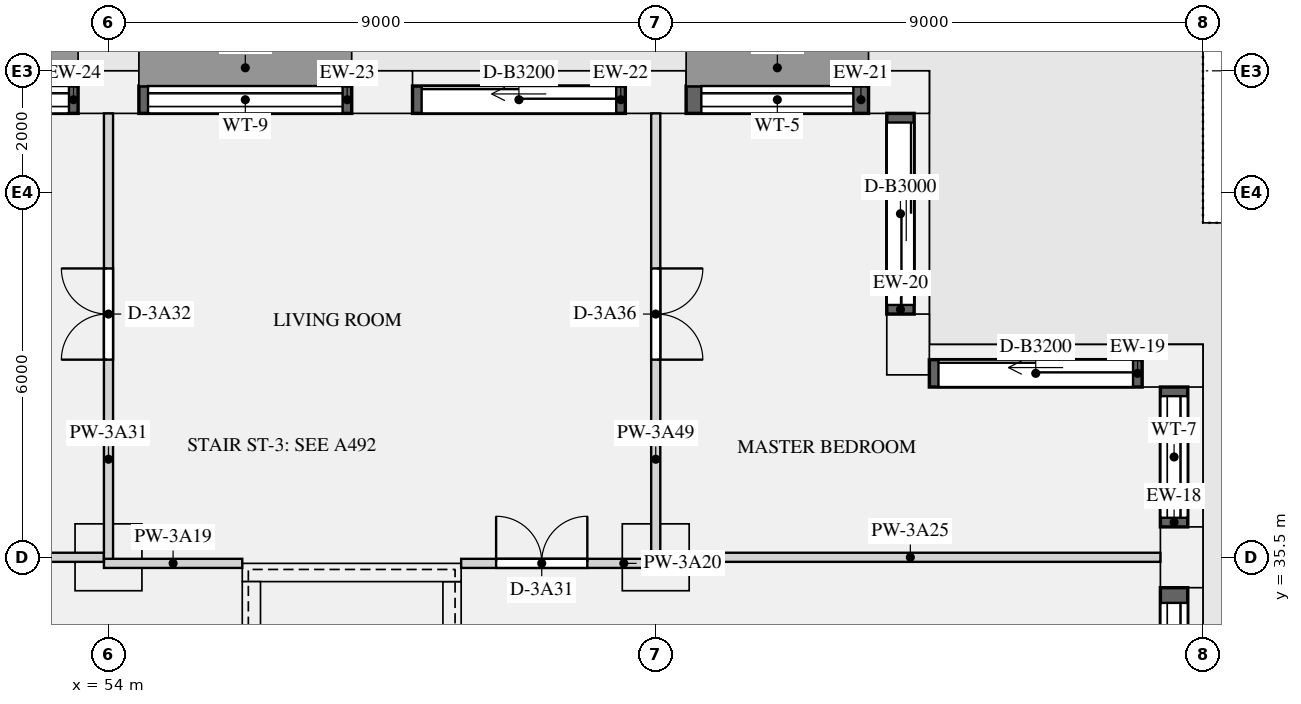
"""IFC4 building model, lengths in metres.
Left out: names, types, materials, properties, quantities, classifications, styles, units other than length and angle.
Written with IfcOpenShell. Run it as: python <this file> out.ifc"""

import sys

from ifc_helpers import new_model, si_unit, direction, frame, frame_2d, origin, origin_2d, place, context, subcontext, project, spatial, rectangle, extrude, element, fill, save


model = new_model("IFC4")
c1 = context("Model", 3, precision=1e-05, world=origin(), true_north=direction((0.0, 1.0)))
c2 = subcontext(c1, "Body", "Model", "MODEL_VIEW")
j1 = project(units=[si_unit("LENGTHUNIT", "METRE"), si_unit("PLANEANGLEUNIT", "RADIAN")], contexts=[c1])
p1 = place(None, origin())
s1 = spatial("IfcSite", under=j1, at=p1, CompositionType="ELEMENT")
p2 = place(p1, origin())
s2 = spatial("IfcBuilding", under=s1, at=p2, CompositionType="ELEMENT")
p3 = place(p2, frame((0.0, 0.0, 141.3)))
s3 = spatial("IfcBuildingStorey", under=s2, at=p3, CompositionType="ELEMENT", Elevation=141.3)
for number, where, z_axis, x_axis in (
    (1, (71.65, 35.5, 0.0), (0.0, 0.0, 1.0), (0.0, 1.0, 0.0)),
    (2, (71.5, 38.65, 0.0), (0.0, 0.0, 1.0), (-1.0, 0.0, 0.0)),
    (3, (67.15, 39.0, 0.0), (0.0, 0.0, 1.0), (0.0, 1.0, 0.0)),
    (4, (67.0, 43.15, 0.0), (0.0, 0.0, 1.0), (-1.0, 0.0, 0.0)),
    (5, (63.0, 43.15, 0.0), (0.0, 0.0, 1.0), (-1.0, 0.0, 0.0)),
    (6, (58.5, 43.15, 0.0), (0.0, 0.0, 1.0), (-1.0, 0.0, 0.0)),
    (7, (54.0, 43.15, 0.0), (0.0, 0.0, 1.0), (-1.0, 0.0, 0.0)),
):
    element("IfcColumn", number, at=place(p3, frame(where, z_axis=z_axis, x_axis=x_axis)), inside=s3, PredefinedType="USERDEFINED", context=c2, shape_type="SweptSolid", body=[
        extrude(rectangle(XDim=1.0, YDim=0.7, at=origin_2d()), origin(), (0.0, 0.0, 1.0), 3.15),
    ])
for number, where, z_axis, x_axis in (
    (8, (54.0, 35.5, 0.0), (0.0, 0.0, 1.0), (1.0, 0.0, 0.0)),
    (9, (63.0, 35.5, 0.0), (0.0, 0.0, 1.0), (1.0, 0.0, 0.0)),
):
    element("IfcColumn", number, at=place(p3, frame(where, z_axis=z_axis, x_axis=x_axis)), inside=s3, PredefinedType="COLUMN", context=c2, shape_type="SweptSolid", body=[
        extrude(rectangle(XDim=1.1, YDim=1.1, at=origin_2d()), origin(), (0.0, 0.0, 1.0), 3.15),
    ])
p4 = place(p3, frame((56.2, 35.25, 0.0), z_axis=(0.0, 0.0, 1.0), x_axis=(1.0, 0.0, 0.0)))
e10 = element("IfcWall", 10, at=p4, inside=s3, PredefinedType="SHEAR", context=c2, shape_type="SweptSolid", body=[
    extrude(rectangle(XDim=3.6, YDim=0.3, at=frame_2d((1.8, 0.0))), origin(), (0.0, 0.0, 1.0), 3.15),
])
for number, where, z_axis, x_axis in (
    (11, (56.35, 27.3, 0.0), (0.0, 0.0, 1.0), (0.0, 1.0, 0.0)),
    (12, (59.65, 27.3, 0.0), (0.0, 0.0, 1.0), (0.0, 1.0, 0.0)),
):
    element("IfcWall", number, at=place(p3, frame(where, z_axis=z_axis, x_axis=x_axis)), inside=s3, PredefinedType="SHEAR", context=c2, shape_type="SweptSolid", body=[
        extrude(rectangle(XDim=7.8, YDim=0.3, at=frame_2d((3.9, 0.0))), origin(), (0.0, 0.0, 1.0), 3.15),
    ])
p5 = place(p3, frame((71.525, 32.5, 0.9), z_axis=(0.0, 0.0, 1.0), x_axis=(0.0, 1.0, 0.0)))
e13 = element("IfcWall", 13, at=p5, inside=s3, PredefinedType="SOLIDWALL", context=c2, shape_type="SweptSolid", body=[
    extrude(rectangle(XDim=2.5, YDim=0.45, at=frame_2d((1.25, 0.0))), origin(), (0.0, 0.0, 1.0), 1.93),
])
p6 = place(p5, frame((0.25, 0.0, 0.15)))
e14 = element("IfcOpeningElement", 14, at=p6, cuts=e13, PredefinedType="OPENING", context=c2, shape_type="SweptSolid", body=[
    extrude(rectangle(XDim=2.0, YDim=1.5, at=frame_2d((1.0, 0.75))), frame((0.0, 0.235, 0.0), z_axis=(0.0, -1.0, 0.0), x_axis=(1.0, 0.0, 0.0)), (0.0, 0.0, 1.0), 0.47),
])
p7 = place(p3, frame((71.525, 36.0, 0.9), z_axis=(0.0, 0.0, 1.0), x_axis=(0.0, 1.0, 0.0)))
e15 = element("IfcWall", 15, at=p7, inside=s3, PredefinedType="SOLIDWALL", context=c2, shape_type="SweptSolid", body=[
    extrude(rectangle(XDim=2.3, YDim=0.45, at=frame_2d((1.15, 0.0))), origin(), (0.0, 0.0, 1.0), 1.93),
])
p8 = place(p7, frame((0.15, 0.0, 0.15)))
e16 = element("IfcOpeningElement", 16, at=p8, cuts=e15, PredefinedType="OPENING", context=c2, shape_type="SweptSolid", body=[
    extrude(rectangle(XDim=2.0, YDim=1.5, at=frame_2d((1.0, 0.75))), frame((0.0, 0.235, 0.0), z_axis=(0.0, -1.0, 0.0), x_axis=(1.0, 0.0, 0.0)), (0.0, 0.0, 1.0), 0.47),
])
p9 = place(p3, frame((71.0, 38.525, 0.0), z_axis=(0.0, 0.0, 1.0), x_axis=(-1.0, 0.0, 0.0)))
e17 = element("IfcWall", 17, at=p9, inside=s3, PredefinedType="SOLIDWALL", context=c2, shape_type="SweptSolid", body=[
    extrude(rectangle(XDim=3.5, YDim=0.45, at=frame_2d((1.75, 0.0))), origin(), (0.0, 0.0, 1.0), 2.83),
])
p10 = place(p9, frame((0.15, 0.0, 0.0)))
e18 = element("IfcOpeningElement", 18, at=p10, cuts=e17, PredefinedType="OPENING", context=c2, shape_type="SweptSolid", body=[
    extrude(rectangle(XDim=3.2, YDim=2.3, at=frame_2d((1.6, 1.15))), frame((0.0, 0.235, 0.0), z_axis=(0.0, -1.0, 0.0), x_axis=(1.0, 0.0, 0.0)), (0.0, 0.0, 1.0), 0.47),
])
p11 = place(p3, frame((67.025, 39.5, 0.0), z_axis=(0.0, 0.0, 1.0), x_axis=(0.0, 1.0, 0.0)))
e19 = element("IfcWall", 19, at=p11, inside=s3, PredefinedType="SOLIDWALL", context=c2, shape_type="SweptSolid", body=[
    extrude(rectangle(XDim=3.3, YDim=0.45, at=frame_2d((1.65, 0.0))), origin(), (0.0, 0.0, 1.0), 2.83),
])
p12 = place(p11, frame((0.15, 0.0, 0.0)))
e20 = element("IfcOpeningElement", 20, at=p12, cuts=e19, PredefinedType="OPENING", context=c2, shape_type="SweptSolid", body=[
    extrude(rectangle(XDim=3.0, YDim=2.3, at=frame_2d((1.5, 1.15))), frame((0.0, 0.235, 0.0), z_axis=(0.0, -1.0, 0.0), x_axis=(1.0, 0.0, 0.0)), (0.0, 0.0, 1.0), 0.47),
])
p13 = place(p3, frame((66.5, 43.025, 0.9), z_axis=(0.0, 0.0, 1.0), x_axis=(-1.0, 0.0, 0.0)))
e21 = element("IfcWall", 21, at=p13, inside=s3, PredefinedType="SOLIDWALL", context=c2, shape_type="SweptSolid", body=[
    extrude(rectangle(XDim=3.0, YDim=0.45, at=frame_2d((1.5, 0.0))), origin(), (0.0, 0.0, 1.0), 1.93),
])
p14 = place(p13, frame((0.25, 0.0, 0.15)))
e22 = element("IfcOpeningElement", 22, at=p14, cuts=e21, PredefinedType="OPENING", context=c2, shape_type="SweptSolid", body=[
    extrude(rectangle(XDim=2.5, YDim=1.5, at=frame_2d((1.25, 0.75))), frame((0.0, 0.235, 0.0), z_axis=(0.0, -1.0, 0.0), x_axis=(1.0, 0.0, 0.0)), (0.0, 0.0, 1.0), 0.47),
])
p15 = place(p3, frame((62.5, 43.025, 0.0), z_axis=(0.0, 0.0, 1.0), x_axis=(-1.0, 0.0, 0.0)))
e23 = element("IfcWall", 23, at=p15, inside=s3, PredefinedType="SOLIDWALL", context=c2, shape_type="SweptSolid", body=[
    extrude(rectangle(XDim=3.5, YDim=0.45, at=frame_2d((1.75, 0.0))), origin(), (0.0, 0.0, 1.0), 2.83),
])
p16 = place(p15, frame((0.15, 0.0, 0.0)))
e24 = element("IfcOpeningElement", 24, at=p16, cuts=e23, PredefinedType="OPENING", context=c2, shape_type="SweptSolid", body=[
    extrude(rectangle(XDim=3.2, YDim=2.3, at=frame_2d((1.6, 1.15))), frame((0.0, 0.235, 0.0), z_axis=(0.0, -1.0, 0.0), x_axis=(1.0, 0.0, 0.0)), (0.0, 0.0, 1.0), 0.47),
])
p17 = place(p3, frame((58.0, 43.025, 0.9), z_axis=(0.0, 0.0, 1.0), x_axis=(-1.0, 0.0, 0.0)))
e25 = element("IfcWall", 25, at=p17, inside=s3, PredefinedType="SOLIDWALL", context=c2, shape_type="SweptSolid", body=[
    extrude(rectangle(XDim=3.5, YDim=0.45, at=frame_2d((1.75, 0.0))), origin(), (0.0, 0.0, 1.0), 1.93),
])
p18 = place(p17, frame((0.15, 0.0, 0.15)))
e26 = element("IfcOpeningElement", 26, at=p18, cuts=e25, PredefinedType="OPENING", context=c2, shape_type="SweptSolid", body=[
    extrude(rectangle(XDim=3.2, YDim=1.5, at=frame_2d((1.6, 0.75))), frame((0.0, 0.235, 0.0), z_axis=(0.0, -1.0, 0.0), x_axis=(1.0, 0.0, 0.0)), (0.0, 0.0, 1.0), 0.47),
])
p19 = place(p3, frame((53.5, 43.025, 0.9), z_axis=(0.0, 0.0, 1.0), x_axis=(-1.0, 0.0, 0.0)))
e27 = element("IfcWall", 27, at=p19, inside=s3, PredefinedType="SOLIDWALL", context=c2, shape_type="SweptSolid", body=[
    extrude(rectangle(XDim=3.5, YDim=0.45, at=frame_2d((1.75, 0.0))), origin(), (0.0, 0.0, 1.0), 1.93),
])
p20 = place(p19, frame((0.15, 0.0, 0.15)))
e28 = element("IfcOpeningElement", 28, at=p20, cuts=e27, PredefinedType="OPENING", context=c2, shape_type="SweptSolid", body=[
    extrude(rectangle(XDim=3.2, YDim=1.5, at=frame_2d((1.6, 0.75))), frame((0.0, 0.235, 0.0), z_axis=(0.0, -1.0, 0.0), x_axis=(1.0, 0.0, 0.0)), (0.0, 0.0, 1.0), 0.47),
])
p21 = place(p3, frame((53.925, 35.4, 0.0), z_axis=(0.0, 0.0, 1.0), x_axis=(1.0, 0.0, 0.0)))
e29 = element("IfcWall", 29, at=p21, inside=s3, PredefinedType="PARTITIONING", context=c2, shape_type="SweptSolid", body=[
    extrude(rectangle(XDim=2.275, YDim=0.15, at=frame_2d((1.137, 0.0))), origin(), (0.0, 0.0, 1.0), 2.83),
])
p22 = place(p3, frame((59.8, 35.4, 0.0), z_axis=(0.0, 0.0, 1.0), x_axis=(1.0, 0.0, 0.0)))
e30 = element("IfcWall", 30, at=p22, inside=s3, PredefinedType="PARTITIONING", context=c2, shape_type="SweptSolid", body=[
    extrude(rectangle(XDim=3.275, YDim=0.15, at=frame_2d((1.637, 0.0))), origin(), (0.0, 0.0, 1.0), 2.83),
])
p23 = place(p22, frame((0.575, 0.0, 0.0)))
e31 = element("IfcOpeningElement", 31, at=p23, cuts=e30, PredefinedType="OPENING", context=c2, shape_type="SweptSolid", body=[
    extrude(rectangle(XDim=1.5, YDim=2.1, at=frame_2d((0.75, 1.05))), frame((0.0, 0.085, 0.0), z_axis=(0.0, -1.0, 0.0), x_axis=(1.0, 0.0, 0.0)), (0.0, 0.0, 1.0), 0.17),
])
p24 = place(p3, frame((45.0, 35.5, 0.0), z_axis=(0.0, 0.0, 1.0), x_axis=(1.0, 0.0, 0.0)))
e32 = element("IfcWall", 32, at=p24, inside=s3, PredefinedType="PARTITIONING", context=c2, shape_type="SweptSolid", body=[
    extrude(rectangle(XDim=8.925, YDim=0.15, at=frame_2d((4.462, 0.0))), origin(), (0.0, 0.0, 1.0), 2.83),
])
p25 = place(p24, frame((5.275, 0.0, 0.0)))
e33 = element("IfcOpeningElement", 33, at=p25, cuts=e32, PredefinedType="OPENING", context=c2, shape_type="SweptSolid", body=[
    extrude(rectangle(XDim=0.9, YDim=2.1, at=frame_2d((0.45, 1.05))), frame((0.0, 0.085, 0.0), z_axis=(0.0, -1.0, 0.0), x_axis=(1.0, 0.0, 0.0)), (0.0, 0.0, 1.0), 0.17),
])
p26 = place(p24, frame((1.325, 0.0, 0.0)))
e34 = element("IfcOpeningElement", 34, at=p26, cuts=e32, PredefinedType="OPENING", context=c2, shape_type="SweptSolid", body=[
    extrude(rectangle(XDim=0.9, YDim=2.1, at=frame_2d((0.45, 1.05))), frame((0.0, 0.085, 0.0), z_axis=(0.0, -1.0, 0.0), x_axis=(1.0, 0.0, 0.0)), (0.0, 0.0, 1.0), 0.17),
])
p27 = place(p3, frame((63.075, 35.5, 0.0), z_axis=(0.0, 0.0, 1.0), x_axis=(1.0, 0.0, 0.0)))
e35 = element("IfcWall", 35, at=p27, inside=s3, PredefinedType="PARTITIONING", context=c2, shape_type="SweptSolid", body=[
    extrude(rectangle(XDim=8.225, YDim=0.15, at=frame_2d((4.113, 0.0))), origin(), (0.0, 0.0, 1.0), 2.83),
])
p28 = place(p3, frame((54.0, 35.475, 0.0), z_axis=(0.0, 0.0, 1.0), x_axis=(0.0, 1.0, 0.0)))
e36 = element("IfcWall", 36, at=p28, inside=s3, PredefinedType="PARTITIONING", context=c2, shape_type="SweptSolid", body=[
    extrude(rectangle(XDim=7.325, YDim=0.15, at=frame_2d((3.663, 0.0))), origin(), (0.0, 0.0, 1.0), 2.83),
])
p29 = place(p28, frame((3.275, 0.0, 0.0)))
e37 = element("IfcOpeningElement", 37, at=p29, cuts=e36, PredefinedType="OPENING", context=c2, shape_type="SweptSolid", body=[
    extrude(rectangle(XDim=1.5, YDim=2.1, at=frame_2d((0.75, 1.05))), frame((0.0, 0.085, 0.0), z_axis=(0.0, -1.0, 0.0), x_axis=(1.0, 0.0, 0.0)), (0.0, 0.0, 1.0), 0.17),
])
p30 = place(p3, frame((63.0, 35.475, 0.0), z_axis=(0.0, 0.0, 1.0), x_axis=(0.0, 1.0, 0.0)))
e38 = element("IfcWall", 38, at=p30, inside=s3, PredefinedType="PARTITIONING", context=c2, shape_type="SweptSolid", body=[
    extrude(rectangle(XDim=7.325, YDim=0.15, at=frame_2d((3.663, 0.0))), origin(), (0.0, 0.0, 1.0), 2.83),
])
p31 = place(p30, frame((3.275, 0.0, 0.0)))
e39 = element("IfcOpeningElement", 39, at=p31, cuts=e38, PredefinedType="OPENING", context=c2, shape_type="SweptSolid", body=[
    extrude(rectangle(XDim=1.5, YDim=2.1, at=frame_2d((0.75, 1.05))), frame((0.0, 0.085, 0.0), z_axis=(0.0, -1.0, 0.0), x_axis=(1.0, 0.0, 0.0)), (0.0, 0.0, 1.0), 0.17),
])
p32 = place(p6, origin())
e40 = element("IfcWindow", 40, at=p32, inside=s3, PartitioningType="SINGLE_PANEL", PredefinedType="WINDOW", context=c2, shape_type="SweptSolid", body=[
    extrude(rectangle(XDim=2.0, YDim=1.5, at=frame_2d((1.0, 0.75))), frame((0.0, -0.065, 0.0), z_axis=(0.0, -1.0, 0.0), x_axis=(1.0, 0.0, 0.0)), (0.0, 0.0, 1.0), 0.06),
])
fill(e14, e40)
p33 = place(p8, origin())
e41 = element("IfcWindow", 41, at=p33, inside=s3, PartitioningType="SINGLE_PANEL", PredefinedType="WINDOW", context=c2, shape_type="SweptSolid", body=[
    extrude(rectangle(XDim=2.0, YDim=1.5, at=frame_2d((1.0, 0.75))), frame((0.0, -0.065, 0.0), z_axis=(0.0, -1.0, 0.0), x_axis=(1.0, 0.0, 0.0)), (0.0, 0.0, 1.0), 0.06),
])
fill(e16, e41)
p34 = place(p10, origin())
e42 = element("IfcDoor", 42, at=p34, inside=s3, OperationType="SLIDING_TO_LEFT", PredefinedType="DOOR", context=c2, shape_type="SweptSolid", body=[
    extrude(rectangle(XDim=3.2, YDim=2.3, at=frame_2d((1.6, 1.15))), frame((0.0, -0.07, 0.0), z_axis=(0.0, -1.0, 0.0), x_axis=(1.0, 0.0, 0.0)), (0.0, 0.0, 1.0), 0.05),
])
fill(e18, e42)
p35 = place(p12, origin())
e43 = element("IfcDoor", 43, at=p35, inside=s3, OperationType="SLIDING_TO_LEFT", PredefinedType="DOOR", context=c2, shape_type="SweptSolid", body=[
    extrude(rectangle(XDim=3.0, YDim=2.3, at=frame_2d((1.5, 1.15))), frame((0.0, -0.07, 0.0), z_axis=(0.0, -1.0, 0.0), x_axis=(1.0, 0.0, 0.0)), (0.0, 0.0, 1.0), 0.05),
])
fill(e20, e43)
p36 = place(p14, origin())
e44 = element("IfcWindow", 44, at=p36, inside=s3, PartitioningType="SINGLE_PANEL", PredefinedType="WINDOW", context=c2, shape_type="SweptSolid", body=[
    extrude(rectangle(XDim=2.5, YDim=1.5, at=frame_2d((1.25, 0.75))), frame((0.0, -0.065, 0.0), z_axis=(0.0, -1.0, 0.0), x_axis=(1.0, 0.0, 0.0)), (0.0, 0.0, 1.0), 0.06),
])
fill(e22, e44)
p37 = place(p16, origin())
e45 = element("IfcDoor", 45, at=p37, inside=s3, OperationType="SLIDING_TO_LEFT", PredefinedType="DOOR", context=c2, shape_type="SweptSolid", body=[
    extrude(rectangle(XDim=3.2, YDim=2.3, at=frame_2d((1.6, 1.15))), frame((0.0, -0.07, 0.0), z_axis=(0.0, -1.0, 0.0), x_axis=(1.0, 0.0, 0.0)), (0.0, 0.0, 1.0), 0.05),
])
fill(e24, e45)
p38 = place(p18, origin())
e46 = element("IfcWindow", 46, at=p38, inside=s3, PartitioningType="SINGLE_PANEL", PredefinedType="WINDOW", context=c2, shape_type="SweptSolid", body=[
    extrude(rectangle(XDim=3.2, YDim=1.5, at=frame_2d((1.6, 0.75))), frame((0.0, -0.065, 0.0), z_axis=(0.0, -1.0, 0.0), x_axis=(1.0, 0.0, 0.0)), (0.0, 0.0, 1.0), 0.06),
])
fill(e26, e46)
p39 = place(p20, origin())
e47 = element("IfcWindow", 47, at=p39, inside=s3, PartitioningType="SINGLE_PANEL", PredefinedType="WINDOW", context=c2, shape_type="SweptSolid", body=[
    extrude(rectangle(XDim=3.2, YDim=1.5, at=frame_2d((1.6, 0.75))), frame((0.0, -0.065, 0.0), z_axis=(0.0, -1.0, 0.0), x_axis=(1.0, 0.0, 0.0)), (0.0, 0.0, 1.0), 0.06),
])
fill(e28, e47)
p40 = place(p23, origin())
e48 = element("IfcDoor", 48, at=p40, inside=s3, OperationType="DOUBLE_DOOR_SINGLE_SWING", PredefinedType="DOOR", context=c2, shape_type="SweptSolid", body=[
    extrude(rectangle(XDim=1.5, YDim=2.1, at=frame_2d((0.75, 1.05))), frame((0.0, 0.025, 0.0), z_axis=(0.0, -1.0, 0.0), x_axis=(1.0, 0.0, 0.0)), (0.0, 0.0, 1.0), 0.05),
])
fill(e31, e48)
p41 = place(p29, origin())
e49 = element("IfcDoor", 49, at=p41, inside=s3, OperationType="DOUBLE_DOOR_SINGLE_SWING", PredefinedType="DOOR", context=c2, shape_type="SweptSolid", body=[
    extrude(rectangle(XDim=1.5, YDim=2.1, at=frame_2d((0.75, 1.05))), frame((0.0, 0.025, 0.0), z_axis=(0.0, -1.0, 0.0), x_axis=(1.0, 0.0, 0.0)), (0.0, 0.0, 1.0), 0.05),
])
fill(e37, e49)
p42 = place(p31, frame((1.5, 0.0, 0.0), z_axis=(0.0, 0.0, 1.0), x_axis=(-1.0, 0.0, 0.0)))
e50 = element("IfcDoor", 50, at=p42, inside=s3, OperationType="DOUBLE_DOOR_SINGLE_SWING", PredefinedType="DOOR", context=c2, shape_type="SweptSolid", body=[
    extrude(rectangle(XDim=1.5, YDim=2.1, at=frame_2d((0.75, 1.05))), frame((0.0, 0.025, 0.0), z_axis=(0.0, -1.0, 0.0), x_axis=(1.0, 0.0, 0.0)), (0.0, 0.0, 1.0), 0.05),
])
fill(e39, e50)
save(model, sys.argv[1])
